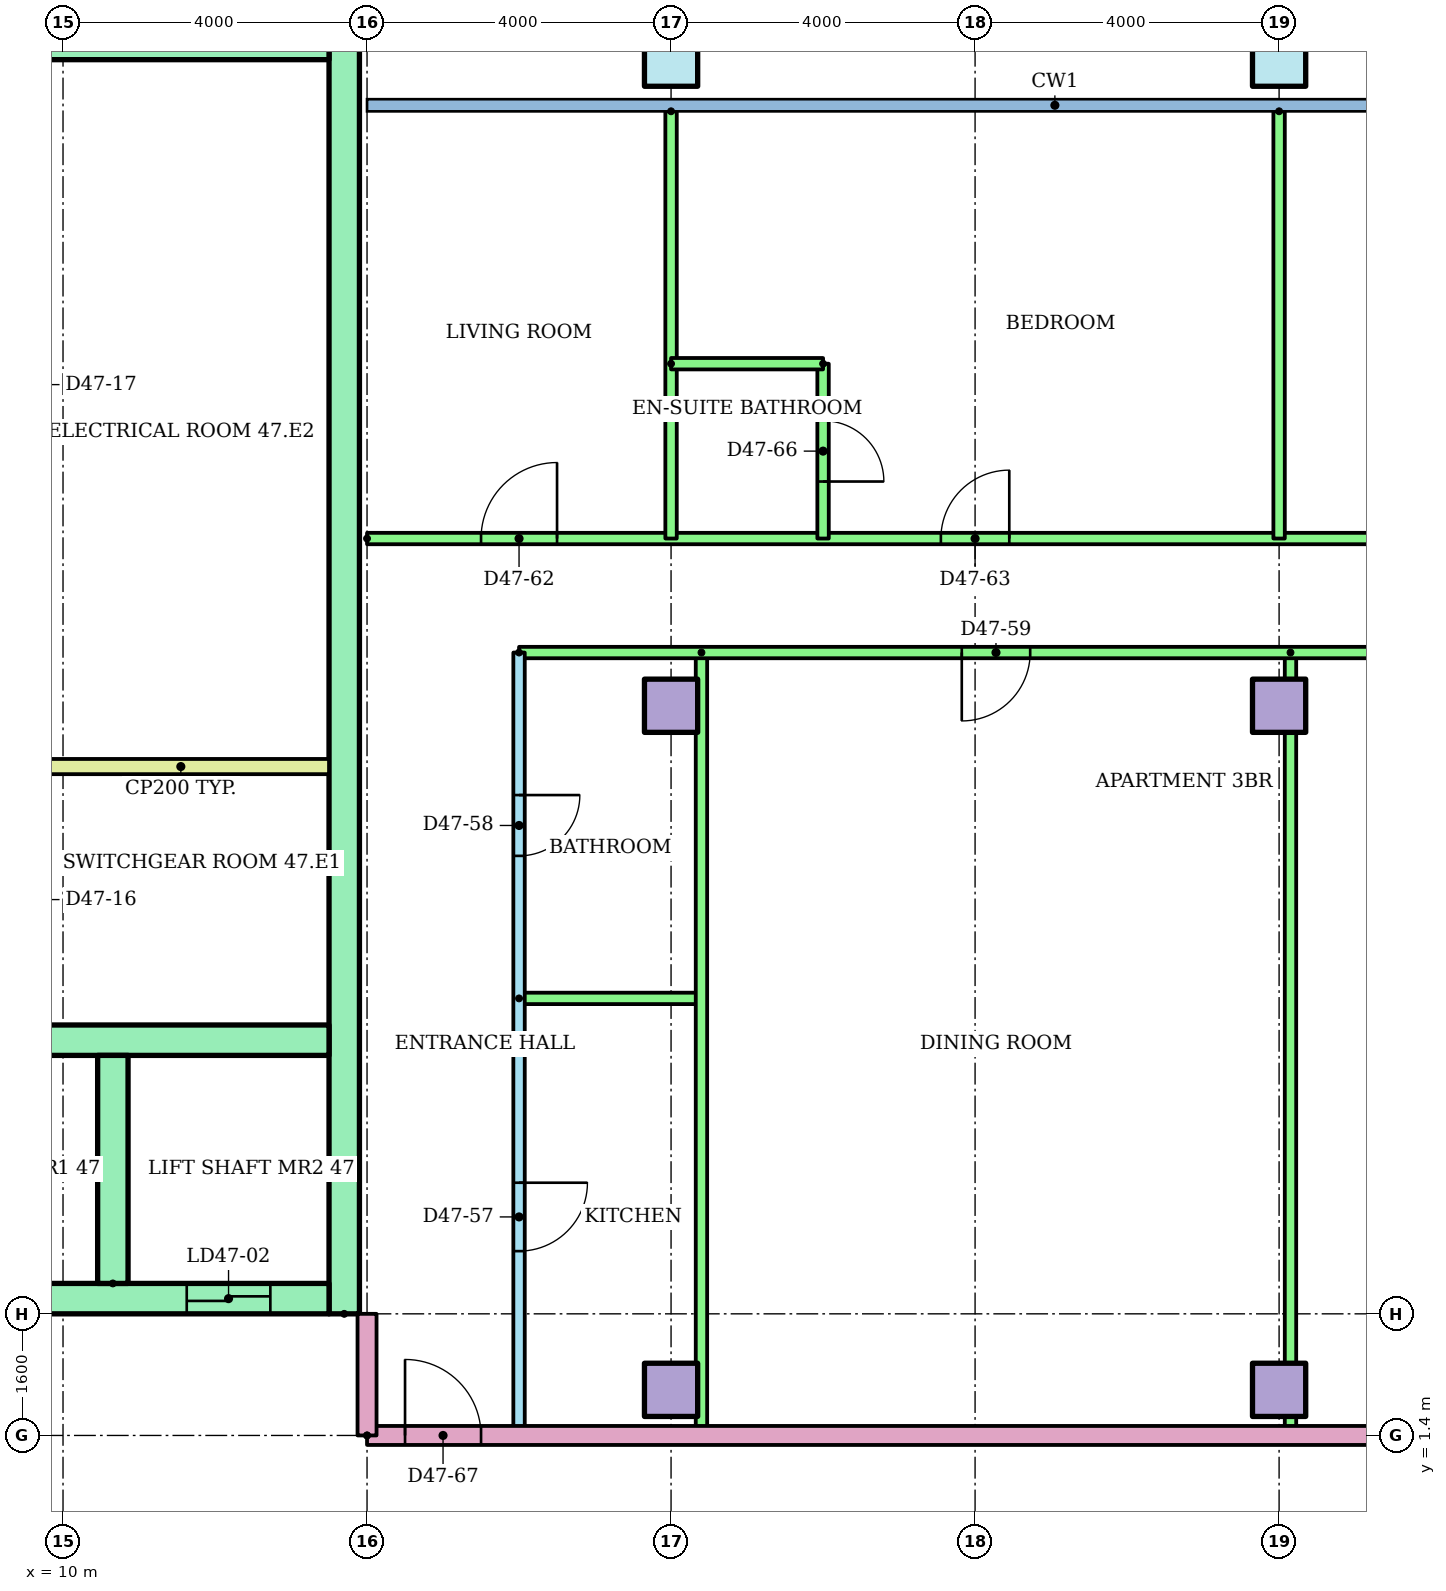
"""IFC4 building model, lengths in metres.
Left out: names, types, materials, properties, quantities, classifications, styles, units other than length and angle.
Written with IfcOpenShell. Run it as: python <this file> out.ifc"""

import sys

from ifc_helpers import new_model, si_unit, direction, frame, frame_2d, origin, origin_2d, place, context, subcontext, project, spatial, rectangle, hollow_rectangle, extrude, element, fill, save


model = new_model("IFC4")
c1 = context("Model", 3, precision=1e-05, world=origin(), true_north=direction((0.0, 1.0)))
c2 = subcontext(c1, "Body", "Model", "MODEL_VIEW")
j1 = project(units=[si_unit("LENGTHUNIT", "METRE"), si_unit("PLANEANGLEUNIT", "RADIAN")], contexts=[c1])
p1 = place(None, origin())
s1 = spatial("IfcSite", under=j1, at=p1, CompositionType="ELEMENT")
p2 = place(p1, origin())
s2 = spatial("IfcBuilding", under=s1, at=p2, CompositionType="ELEMENT")
p3 = place(p2, frame((0.0, 0.0, 181.3)))
s3 = spatial("IfcBuildingStorey", under=s2, at=p3, CompositionType="ELEMENT", Elevation=181.3)
for number, where in (
    (1, (18.0, 2.0, 0.0)),
    (2, (26.0, 2.0, 0.0)),
    (3, (18.0, 11.0, 0.0)),
    (4, (26.0, 11.0, 0.0)),
):
    element("IfcColumn", number, at=place(p3, frame(where)), inside=s3, PredefinedType="COLUMN", context=c2, shape_type="SweptSolid", body=[
        extrude(rectangle(XDim=0.7, YDim=0.7, at=origin_2d()), origin(), (0.0, 0.0, 1.0), 3.2),
    ])
for number, where in (
    (5, (18.0, 19.5, 0.0)),
    (6, (26.0, 19.5, 0.0)),
):
    element("IfcColumn", number, at=place(p3, frame(where)), inside=s3, PredefinedType="COLUMN", context=c2, shape_type="SweptSolid", body=[
        extrude(hollow_rectangle(XDim=0.7, YDim=0.7, WallThickness=0.036, at=origin_2d()), origin(), (0.0, 0.0, 1.0), 3.2),
    ])
p4 = place(p3, frame((13.7, 3.0, 0.0), z_axis=(0.0, 0.0, 1.0), x_axis=(0.0, 1.0, 0.0)))
e7 = element("IfcWall", 7, at=p4, inside=s3, PredefinedType="SHEAR", context=c2, shape_type="SweptSolid", body=[
    extrude(rectangle(XDim=17.0, YDim=0.4, at=frame_2d((8.5, 0.0))), origin(), (0.0, 0.0, 1.0), 2.92),
])
p5 = place(p3, frame((-13.5, 19.7, 0.0)))
e8 = element("IfcWall", 8, at=p5, inside=s3, PredefinedType="SHEAR", context=c2, shape_type="SweptSolid", body=[
    extrude(rectangle(XDim=27.0, YDim=0.4, at=frame_2d((13.5, 0.0))), origin(), (0.0, 0.0, 1.0), 2.92),
])
p6 = place(p3, frame((-13.5, 3.2, 0.0)))
e9 = element("IfcWall", 9, at=p6, inside=s3, PredefinedType="SHEAR", context=c2, shape_type="SweptSolid", body=[
    extrude(rectangle(XDim=27.0, YDim=0.4, at=frame_2d((13.5, 0.0))), origin(), (0.0, 0.0, 1.0), 2.92),
])
p7 = place(p6, frame((22.083, 0.0, 0.0)))
e10 = element("IfcOpeningElement", 10, at=p7, cuts=e9, PredefinedType="OPENING", context=c2, shape_type="SweptSolid", body=[
    extrude(rectangle(XDim=1.1, YDim=2.1, at=frame_2d((0.55, 1.05))), frame((0.0, 0.21, 0.0), z_axis=(0.0, -1.0, 0.0), x_axis=(1.0, 0.0, 0.0)), (0.0, 0.0, 1.0), 0.42),
])
p8 = place(p6, frame((25.128, 0.0, 0.0)))
e11 = element("IfcOpeningElement", 11, at=p8, cuts=e9, PredefinedType="OPENING", context=c2, shape_type="SweptSolid", body=[
    extrude(rectangle(XDim=1.1, YDim=2.1, at=frame_2d((0.55, 1.05))), frame((0.0, 0.21, 0.0), z_axis=(0.0, -1.0, 0.0), x_axis=(1.0, 0.0, 0.0)), (0.0, 0.0, 1.0), 0.42),
])
p9 = place(p6, frame((12.6, 0.0, 0.0)))
e12 = element("IfcOpeningElement", 12, at=p9, cuts=e9, PredefinedType="OPENING", context=c2, shape_type="SweptSolid", body=[
    extrude(rectangle(XDim=1.8, YDim=2.1, at=frame_2d((0.9, 1.05))), frame((0.0, 0.21, 0.0), z_axis=(0.0, -1.0, 0.0), x_axis=(1.0, 0.0, 0.0)), (0.0, 0.0, 1.0), 0.42),
])
p10 = place(p3, frame((1.522, 6.6, 0.0)))
e13 = element("IfcWall", 13, at=p10, inside=s3, PredefinedType="SHEAR", context=c2, shape_type="SweptSolid", body=[
    extrude(rectangle(XDim=11.978, YDim=0.4, at=frame_2d((5.989, 0.0))), origin(), (0.0, 0.0, 1.0), 2.92),
])
p11 = place(p10, frame((1.022, 0.0, 0.0)))
e14 = element("IfcOpeningElement", 14, at=p11, cuts=e13, PredefinedType="OPENING", context=c2, shape_type="SweptSolid", body=[
    extrude(rectangle(XDim=1.0, YDim=2.1, at=frame_2d((0.5, 1.05))), frame((0.0, 0.21, 0.0), z_axis=(0.0, -1.0, 0.0), x_axis=(1.0, 0.0, 0.0)), (0.0, 0.0, 1.0), 0.42),
])
p12 = place(p10, frame((4.067, 0.0, 0.0)))
e15 = element("IfcOpeningElement", 15, at=p12, cuts=e13, PredefinedType="OPENING", context=c2, shape_type="SweptSolid", body=[
    extrude(rectangle(XDim=1.0, YDim=2.1, at=frame_2d((0.5, 1.05))), frame((0.0, 0.21, 0.0), z_axis=(0.0, -1.0, 0.0), x_axis=(1.0, 0.0, 0.0)), (0.0, 0.0, 1.0), 0.42),
])
p13 = place(p3, frame((10.656, 3.4, 0.0), z_axis=(0.0, 0.0, 1.0), x_axis=(0.0, 1.0, 0.0)))
e16 = element("IfcWall", 16, at=p13, inside=s3, PredefinedType="SHEAR", context=c2, shape_type="SweptSolid", body=[
    extrude(rectangle(XDim=3.0, YDim=0.4, at=frame_2d((1.5, 0.0))), origin(), (0.0, 0.0, 1.0), 2.92),
])
p14 = place(p3, frame((9.6, 10.2, 0.0)))
e17 = element("IfcWall", 17, at=p14, inside=s3, PredefinedType="PARTITIONING", context=c2, shape_type="SweptSolid", body=[
    extrude(rectangle(XDim=3.9, YDim=0.2, at=frame_2d((1.95, 0.0))), origin(), (0.0, 0.0, 1.0), 2.92),
])
p15 = place(p3, frame((16.0, 11.7, 0.0), z_axis=(0.0, 0.0, 1.0), x_axis=(0.0, -1.0, 0.0)))
e18 = element("IfcWall", 18, at=p15, inside=s3, PredefinedType="PARTITIONING", context=c2, shape_type="SweptSolid", body=[
    extrude(rectangle(XDim=10.3, YDim=0.15, at=frame_2d((5.15, 0.0))), origin(), (0.0, 0.0, 1.0), 2.4),
])
p16 = place(p15, frame((6.975, 0.0, 0.0)))
e19 = element("IfcOpeningElement", 19, at=p16, cuts=e18, PredefinedType="OPENING", context=c2, shape_type="SweptSolid", body=[
    extrude(rectangle(XDim=0.9, YDim=2.1, at=frame_2d((0.45, 1.05))), frame((0.0, 0.085, 0.0), z_axis=(0.0, -1.0, 0.0), x_axis=(1.0, 0.0, 0.0)), (0.0, 0.0, 1.0), 0.17),
])
p17 = place(p15, frame((1.875, 0.0, 0.0)))
e20 = element("IfcOpeningElement", 20, at=p17, cuts=e18, PredefinedType="OPENING", context=c2, shape_type="SweptSolid", body=[
    extrude(rectangle(XDim=0.8, YDim=2.1, at=frame_2d((0.4, 1.05))), frame((0.0, 0.085, 0.0), z_axis=(0.0, -1.0, 0.0), x_axis=(1.0, 0.0, 0.0)), (0.0, 0.0, 1.0), 0.17),
])
p18 = place(p3, frame((16.0, 7.15, 0.0)))
e21 = element("IfcWall", 21, at=p18, inside=s3, PredefinedType="PARTITIONING", context=c2, shape_type="SweptSolid", body=[
    extrude(rectangle(XDim=2.4, YDim=0.15, at=frame_2d((1.2, 0.0))), origin(), (0.0, 0.0, 1.0), 2.4),
])
for number, where, z_axis, x_axis in (
    (22, (18.4, 11.7, 0.0), (0.0, 0.0, 1.0), (0.0, -1.0, 0.0)),
    (23, (26.15, 11.7, 0.0), (0.0, 0.0, 1.0), (0.0, -1.0, 0.0)),
):
    element("IfcWall", number, at=place(p3, frame(where, z_axis=z_axis, x_axis=x_axis)), inside=s3, PredefinedType="PARTITIONING", context=c2, shape_type="SweptSolid", body=[
        extrude(rectangle(XDim=10.3, YDim=0.15, at=frame_2d((5.15, 0.0))), origin(), (0.0, 0.0, 1.0), 2.4),
    ])
p19 = place(p3, frame((36.82, 11.7, 0.0), z_axis=(0.0, 0.0, 1.0), x_axis=(-1.0, 0.0, 0.0)))
e24 = element("IfcWall", 24, at=p19, inside=s3, PredefinedType="PARTITIONING", context=c2, shape_type="SweptSolid", body=[
    extrude(rectangle(XDim=20.82, YDim=0.15, at=frame_2d((10.41, 0.0))), origin(), (0.0, 0.0, 1.0), 2.4),
])
p20 = place(p19, frame((14.095, 0.0, 0.0)))
e25 = element("IfcOpeningElement", 25, at=p20, cuts=e24, PredefinedType="OPENING", context=c2, shape_type="SweptSolid", body=[
    extrude(rectangle(XDim=0.9, YDim=2.1, at=frame_2d((0.45, 1.05))), frame((0.0, 0.085, 0.0), z_axis=(0.0, -1.0, 0.0), x_axis=(1.0, 0.0, 0.0)), (0.0, 0.0, 1.0), 0.17),
])
p21 = place(p19, frame((7.22, 0.0, 0.0)))
e26 = element("IfcOpeningElement", 26, at=p21, cuts=e24, PredefinedType="OPENING", context=c2, shape_type="SweptSolid", body=[
    extrude(rectangle(XDim=0.9, YDim=2.1, at=frame_2d((0.45, 1.05))), frame((0.0, 0.085, 0.0), z_axis=(0.0, -1.0, 0.0), x_axis=(1.0, 0.0, 0.0)), (0.0, 0.0, 1.0), 0.17),
])
p22 = place(p19, frame((1.373, 0.0, 0.0)))
e27 = element("IfcOpeningElement", 27, at=p22, cuts=e24, PredefinedType="OPENING", context=c2, shape_type="SweptSolid", body=[
    extrude(rectangle(XDim=0.9, YDim=2.1, at=frame_2d((0.45, 1.05))), frame((0.0, 0.085, 0.0), z_axis=(0.0, -1.0, 0.0), x_axis=(1.0, 0.0, 0.0)), (0.0, 0.0, 1.0), 0.17),
])
p23 = place(p3, frame((14.0, 13.2, 0.0)))
e28 = element("IfcWall", 28, at=p23, inside=s3, PredefinedType="PARTITIONING", context=c2, shape_type="SweptSolid", body=[
    extrude(rectangle(XDim=22.82, YDim=0.15, at=frame_2d((11.41, 0.0))), origin(), (0.0, 0.0, 1.0), 2.4),
])
p24 = place(p23, frame((1.5, 0.0, 0.0)))
e29 = element("IfcOpeningElement", 29, at=p24, cuts=e28, PredefinedType="OPENING", context=c2, shape_type="SweptSolid", body=[
    extrude(rectangle(XDim=1.0, YDim=2.1, at=frame_2d((0.5, 1.05))), frame((0.0, 0.085, 0.0), z_axis=(0.0, -1.0, 0.0), x_axis=(1.0, 0.0, 0.0)), (0.0, 0.0, 1.0), 0.17),
])
p25 = place(p23, frame((7.55, 0.0, 0.0)))
e30 = element("IfcOpeningElement", 30, at=p25, cuts=e28, PredefinedType="OPENING", context=c2, shape_type="SweptSolid", body=[
    extrude(rectangle(XDim=0.9, YDim=2.1, at=frame_2d((0.45, 1.05))), frame((0.0, 0.085, 0.0), z_axis=(0.0, -1.0, 0.0), x_axis=(1.0, 0.0, 0.0)), (0.0, 0.0, 1.0), 0.17),
])
p26 = place(p23, frame((14.6, 0.0, 0.0)))
e31 = element("IfcOpeningElement", 31, at=p26, cuts=e28, PredefinedType="OPENING", context=c2, shape_type="SweptSolid", body=[
    extrude(rectangle(XDim=0.9, YDim=2.1, at=frame_2d((0.45, 1.05))), frame((0.0, 0.085, 0.0), z_axis=(0.0, -1.0, 0.0), x_axis=(1.0, 0.0, 0.0)), (0.0, 0.0, 1.0), 0.17),
])
p27 = place(p23, frame((19.9, 0.0, 0.0)))
e32 = element("IfcOpeningElement", 32, at=p27, cuts=e28, PredefinedType="OPENING", context=c2, shape_type="SweptSolid", body=[
    extrude(rectangle(XDim=0.9, YDim=2.1, at=frame_2d((0.45, 1.05))), frame((0.0, 0.085, 0.0), z_axis=(0.0, -1.0, 0.0), x_axis=(1.0, 0.0, 0.0)), (0.0, 0.0, 1.0), 0.17),
])
for number, where, z_axis, x_axis in (
    (33, (18.0, 18.821, 0.0), (0.0, 0.0, 1.0), (0.0, -1.0, 0.0)),
    (34, (26.0, 18.821, 0.0), (0.0, 0.0, 1.0), (0.0, -1.0, 0.0)),
):
    element("IfcWall", number, at=place(p3, frame(where, z_axis=z_axis, x_axis=x_axis)), inside=s3, PredefinedType="PARTITIONING", context=c2, shape_type="SweptSolid", body=[
        extrude(rectangle(XDim=5.621, YDim=0.15, at=frame_2d((2.811, 0.0))), origin(), (0.0, 0.0, 1.0), 2.4),
    ])
p28 = place(p3, frame((20.0, 15.5, 0.0), z_axis=(0.0, 0.0, 1.0), x_axis=(0.0, -1.0, 0.0)))
e35 = element("IfcWall", 35, at=p28, inside=s3, PredefinedType="PARTITIONING", context=c2, shape_type="SweptSolid", body=[
    extrude(rectangle(XDim=2.3, YDim=0.15, at=frame_2d((1.15, 0.0))), origin(), (0.0, 0.0, 1.0), 2.4),
])
p29 = place(p28, frame((0.75, 0.0, 0.0)))
e36 = element("IfcOpeningElement", 36, at=p29, cuts=e35, PredefinedType="OPENING", context=c2, shape_type="SweptSolid", body=[
    extrude(rectangle(XDim=0.8, YDim=2.1, at=frame_2d((0.4, 1.05))), frame((0.0, 0.085, 0.0), z_axis=(0.0, -1.0, 0.0), x_axis=(1.0, 0.0, 0.0)), (0.0, 0.0, 1.0), 0.17),
])
p30 = place(p3, frame((18.0, 15.5, 0.0)))
e37 = element("IfcWall", 37, at=p30, inside=s3, PredefinedType="PARTITIONING", context=c2, shape_type="SweptSolid", body=[
    extrude(rectangle(XDim=2.0, YDim=0.15, at=frame_2d((1.0, 0.0))), origin(), (0.0, 0.0, 1.0), 2.4),
])
p31 = place(p3, frame((14.0, 1.4, 0.0)))
e38 = element("IfcWall", 38, at=p31, inside=s3, PredefinedType="PARTITIONING", context=c2, shape_type="SweptSolid", body=[
    extrude(rectangle(XDim=15.0, YDim=0.25, at=frame_2d((7.5, 0.0))), origin(), (0.0, 0.0, 1.0), 2.4),
])
p32 = place(p31, frame((0.5, 0.0, 0.0)))
e39 = element("IfcOpeningElement", 39, at=p32, cuts=e38, PredefinedType="OPENING", context=c2, shape_type="SweptSolid", body=[
    extrude(rectangle(XDim=1.0, YDim=2.1, at=frame_2d((0.5, 1.05))), frame((0.0, 0.135, 0.0), z_axis=(0.0, -1.0, 0.0), x_axis=(1.0, 0.0, 0.0)), (0.0, 0.0, 1.0), 0.27),
])
p33 = place(p3, frame((14.0, 1.4, 0.0), z_axis=(0.0, 0.0, 1.0), x_axis=(0.0, 1.0, 0.0)))
e40 = element("IfcWall", 40, at=p33, inside=s3, PredefinedType="PARTITIONING", context=c2, shape_type="SweptSolid", body=[
    extrude(rectangle(XDim=1.6, YDim=0.25, at=frame_2d((0.8, 0.0))), origin(), (0.0, 0.0, 1.0), 2.4),
])
p34 = place(p8, origin())
e41 = element("IfcDoor", 41, at=p34, inside=s3, OperationType="SLIDING_TO_LEFT", PredefinedType="DOOR", context=c2, shape_type="SweptSolid", body=[
    extrude(rectangle(XDim=1.1, YDim=2.1, at=frame_2d((0.55, 1.05))), frame((0.0, 0.025, 0.0), z_axis=(0.0, -1.0, 0.0), x_axis=(1.0, 0.0, 0.0)), (0.0, 0.0, 1.0), 0.05),
])
fill(e11, e41)
p35 = place(p16, origin())
e42 = element("IfcDoor", 42, at=p35, inside=s3, OperationType="SINGLE_SWING_LEFT", PredefinedType="DOOR", context=c2, shape_type="SweptSolid", body=[
    extrude(rectangle(XDim=0.9, YDim=2.1, at=frame_2d((0.45, 1.05))), frame((0.0, 0.025, 0.0), z_axis=(0.0, -1.0, 0.0), x_axis=(1.0, 0.0, 0.0)), (0.0, 0.0, 1.0), 0.05),
])
fill(e19, e42)
p36 = place(p17, origin())
e43 = element("IfcDoor", 43, at=p36, inside=s3, OperationType="SINGLE_SWING_LEFT", PredefinedType="DOOR", context=c2, shape_type="SweptSolid", body=[
    extrude(rectangle(XDim=0.8, YDim=2.1, at=frame_2d((0.4, 1.05))), frame((0.0, 0.025, 0.0), z_axis=(0.0, -1.0, 0.0), x_axis=(1.0, 0.0, 0.0)), (0.0, 0.0, 1.0), 0.05),
])
fill(e20, e43)
p37 = place(p20, origin())
e44 = element("IfcDoor", 44, at=p37, inside=s3, OperationType="SINGLE_SWING_RIGHT", PredefinedType="DOOR", context=c2, shape_type="SweptSolid", body=[
    extrude(rectangle(XDim=0.9, YDim=2.1, at=frame_2d((0.45, 1.05))), frame((0.0, 0.025, 0.0), z_axis=(0.0, -1.0, 0.0), x_axis=(1.0, 0.0, 0.0)), (0.0, 0.0, 1.0), 0.05),
])
fill(e25, e44)
p38 = place(p24, origin())
e45 = element("IfcDoor", 45, at=p38, inside=s3, OperationType="SINGLE_SWING_RIGHT", PredefinedType="DOOR", context=c2, shape_type="SweptSolid", body=[
    extrude(rectangle(XDim=1.0, YDim=2.1, at=frame_2d((0.5, 1.05))), frame((0.0, 0.025, 0.0), z_axis=(0.0, -1.0, 0.0), x_axis=(1.0, 0.0, 0.0)), (0.0, 0.0, 1.0), 0.05),
])
fill(e29, e45)
p39 = place(p25, origin())
e46 = element("IfcDoor", 46, at=p39, inside=s3, OperationType="SINGLE_SWING_RIGHT", PredefinedType="DOOR", context=c2, shape_type="SweptSolid", body=[
    extrude(rectangle(XDim=0.9, YDim=2.1, at=frame_2d((0.45, 1.05))), frame((0.0, 0.025, 0.0), z_axis=(0.0, -1.0, 0.0), x_axis=(1.0, 0.0, 0.0)), (0.0, 0.0, 1.0), 0.05),
])
fill(e30, e46)
p40 = place(p29, origin())
e47 = element("IfcDoor", 47, at=p40, inside=s3, OperationType="SINGLE_SWING_RIGHT", PredefinedType="DOOR", context=c2, shape_type="SweptSolid", body=[
    extrude(rectangle(XDim=0.8, YDim=2.1, at=frame_2d((0.4, 1.05))), frame((0.0, 0.025, 0.0), z_axis=(0.0, -1.0, 0.0), x_axis=(1.0, 0.0, 0.0)), (0.0, 0.0, 1.0), 0.05),
])
fill(e36, e47)
p41 = place(p32, origin())
e48 = element("IfcDoor", 48, at=p41, inside=s3, OperationType="SINGLE_SWING_LEFT", PredefinedType="DOOR", context=c2, shape_type="SweptSolid", body=[
    extrude(rectangle(XDim=1.0, YDim=2.1, at=frame_2d((0.5, 1.05))), frame((0.0, 0.025, 0.0), z_axis=(0.0, -1.0, 0.0), x_axis=(1.0, 0.0, 0.0)), (0.0, 0.0, 1.0), 0.05),
])
fill(e39, e48)
save(model, sys.argv[1])
